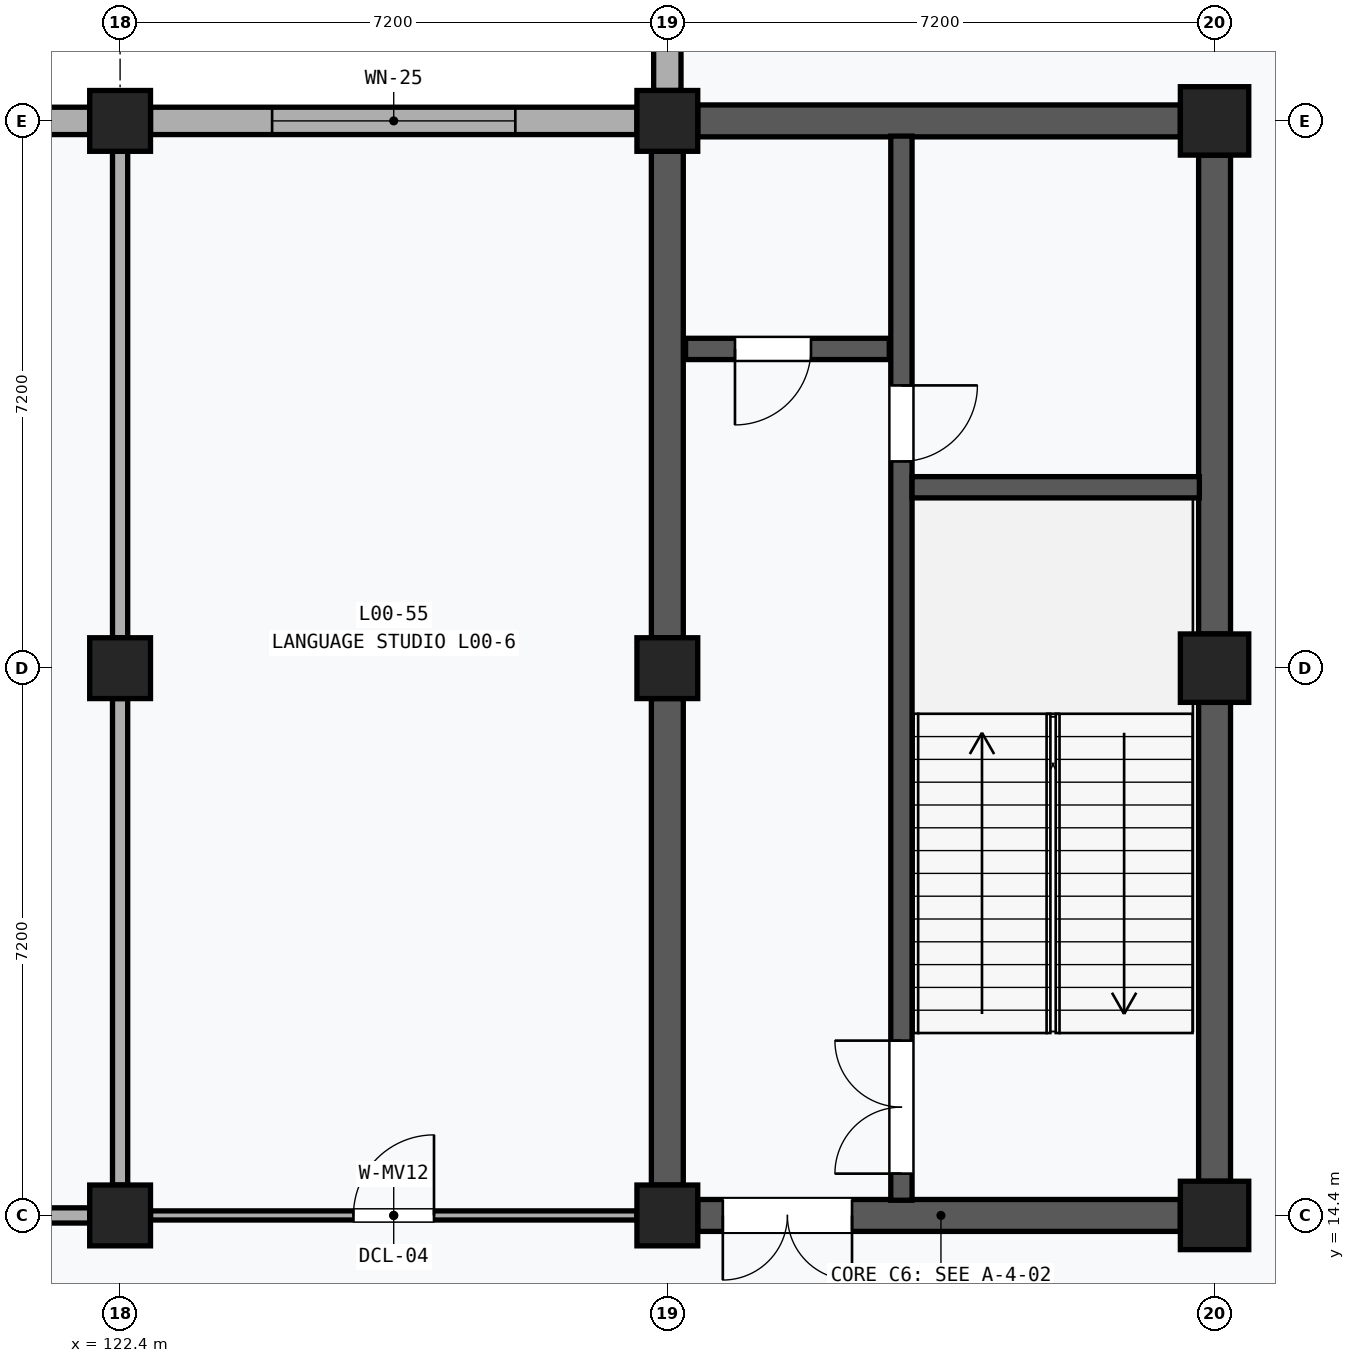
"""IFC4 building model, lengths in metres.
Left out: names, types, materials, properties, quantities, classifications, styles, units other than length and angle.
Written with IfcOpenShell. Run it as: python <this file> out.ifc"""

import sys

from ifc_helpers import new_model, si_unit, direction, frame, frame_2d, origin, origin_2d, place, context, subcontext, project, spatial, rectangle, extrude, element, fill, save


model = new_model("IFC4")
c1 = context("Model", 3, precision=1e-05, world=origin(), true_north=direction((0.0, 1.0)))
c2 = subcontext(c1, "Body", "Model", "MODEL_VIEW")
j1 = project(units=[si_unit("LENGTHUNIT", "METRE"), si_unit("PLANEANGLEUNIT", "RADIAN")], contexts=[c1])
p1 = place(None, origin())
s1 = spatial("IfcSite", under=j1, at=p1, CompositionType="ELEMENT")
p2 = place(p1, origin())
s2 = spatial("IfcBuilding", under=s1, at=p2, CompositionType="ELEMENT")
p3 = place(p2, origin())
s3 = spatial("IfcBuildingStorey", under=s2, at=p3, CompositionType="ELEMENT", Elevation=0.0)
for number, where, z_axis, x_axis in (
    (1, (122.4, 14.4, 0.0), (0.0, 0.0, 1.0), (1.0, 0.0, 0.0)),
    (2, (122.4, 21.6, 0.0), (0.0, 0.0, 1.0), (1.0, 0.0, 0.0)),
    (3, (122.4, 28.8, 0.0), (0.0, 0.0, 1.0), (1.0, 0.0, 0.0)),
    (4, (129.6, 14.4, 0.0), (0.0, 0.0, 1.0), (1.0, 0.0, 0.0)),
    (5, (129.6, 21.6, 0.0), (0.0, 0.0, 1.0), (1.0, 0.0, 0.0)),
    (6, (129.6, 28.8, 0.0), (0.0, 0.0, 1.0), (1.0, 0.0, 0.0)),
):
    element("IfcColumn", number, at=place(p3, frame(where, z_axis=z_axis, x_axis=x_axis)), inside=s3, PredefinedType="COLUMN", context=c2, shape_type="SweptSolid", body=[
        extrude(rectangle(XDim=0.8, YDim=0.8, at=origin_2d()), origin(), (0.0, 0.0, 1.0), 4.8),
    ])
for number, where, z_axis, x_axis in (
    (7, (136.8, 14.4, 0.0), (0.0, 0.0, 1.0), (1.0, 0.0, 0.0)),
    (8, (136.8, 21.6, 0.0), (0.0, 0.0, 1.0), (1.0, 0.0, 0.0)),
    (9, (136.8, 28.8, 0.0), (0.0, 0.0, 1.0), (1.0, 0.0, 0.0)),
):
    element("IfcColumn", number, at=place(p3, frame(where, z_axis=z_axis, x_axis=x_axis)), inside=s3, PredefinedType="COLUMN", context=c2, shape_type="SweptSolid", body=[
        extrude(rectangle(XDim=0.9, YDim=0.9, at=origin_2d()), origin(), (0.0, 0.0, 1.0), 4.8),
    ])
p4 = place(p3, frame((115.45, 28.8, 0.0), z_axis=(0.0, 0.0, 1.0), x_axis=(1.0, 0.0, 0.0)))
e10 = element("IfcWall", 10, at=p4, inside=s3, PredefinedType="SOLIDWALL", context=c2, shape_type="SweptSolid", body=[
    extrude(rectangle(XDim=6.55, YDim=0.36, at=frame_2d((3.275, 0.0))), origin(), (0.0, 0.0, 1.0), 3.89),
])
p5 = place(p4, frame((1.875, 0.0, 0.7)))
e11 = element("IfcOpeningElement", 11, at=p5, cuts=e10, PredefinedType="OPENING", context=c2, shape_type="SweptSolid", body=[
    extrude(rectangle(XDim=2.8, YDim=2.2, at=frame_2d((1.4, 1.1))), frame((0.0, 0.192, 0.0), z_axis=(0.0, -1.0, 0.0), x_axis=(1.0, 0.0, 0.0)), (0.0, 0.0, 1.0), 0.384),
])
p6 = place(p3, frame((122.8, 28.8, 0.0), z_axis=(0.0, 0.0, 1.0), x_axis=(1.0, 0.0, 0.0)))
e12 = element("IfcWall", 12, at=p6, inside=s3, PredefinedType="SOLIDWALL", context=c2, shape_type="SweptSolid", body=[
    extrude(rectangle(XDim=6.4, YDim=0.36, at=frame_2d((3.2, 0.0))), origin(), (0.0, 0.0, 1.0), 3.89),
])
p7 = place(p6, frame((1.6, 0.0, 0.7)))
e13 = element("IfcOpeningElement", 13, at=p7, cuts=e12, PredefinedType="OPENING", context=c2, shape_type="SweptSolid", body=[
    extrude(rectangle(XDim=3.2, YDim=2.2, at=frame_2d((1.6, 1.1))), frame((0.0, 0.192, 0.0), z_axis=(0.0, -1.0, 0.0), x_axis=(1.0, 0.0, 0.0)), (0.0, 0.0, 1.0), 0.384),
])
p8 = place(p3, frame((129.6, 29.2, 0.0), z_axis=(0.0, 0.0, 1.0), x_axis=(0.0, 1.0, 0.0)))
e14 = element("IfcWall", 14, at=p8, inside=s3, PredefinedType="SOLIDWALL", context=c2, shape_type="SweptSolid", body=[
    extrude(rectangle(XDim=6.4, YDim=0.36, at=frame_2d((3.2, 0.0))), origin(), (0.0, 0.0, 1.0), 3.89),
])
p9 = place(p8, frame((1.4, 0.0, 0.7)))
e15 = element("IfcOpeningElement", 15, at=p9, cuts=e14, PredefinedType="OPENING", context=c2, shape_type="SweptSolid", body=[
    extrude(rectangle(XDim=3.6, YDim=2.2, at=frame_2d((1.8, 1.1))), frame((0.0, 0.192, 0.0), z_axis=(0.0, -1.0, 0.0), x_axis=(1.0, 0.0, 0.0)), (0.0, 0.0, 1.0), 0.384),
])
for number, where, z_axis, x_axis in (
    (16, (129.6, 14.8, 0.0), (0.0, 0.0, 1.0), (0.0, 1.0, 0.0)),
    (17, (129.6, 22.0, 0.0), (0.0, 0.0, 1.0), (0.0, 1.0, 0.0)),
):
    element("IfcWall", number, at=place(p3, frame(where, z_axis=z_axis, x_axis=x_axis)), inside=s3, PredefinedType="SHEAR", context=c2, shape_type="SweptSolid", body=[
        extrude(rectangle(XDim=6.4, YDim=0.42, at=frame_2d((3.2, 0.0))), origin(), (0.0, 0.0, 1.0), 3.62),
    ])
p10 = place(p3, frame((136.8, 14.85, 0.0), z_axis=(0.0, 0.0, 1.0), x_axis=(0.0, 1.0, 0.0)))
e18 = element("IfcWall", 18, at=p10, inside=s3, PredefinedType="SHEAR", context=c2, shape_type="SweptSolid", body=[
    extrude(rectangle(XDim=6.3, YDim=0.42, at=frame_2d((3.15, 0.0))), origin(), (0.0, 0.0, 1.0), 3.62),
])
p11 = place(p3, frame((136.8, 22.05, 0.0), z_axis=(0.0, 0.0, 1.0), x_axis=(0.0, 1.0, 0.0)))
e19 = element("IfcWall", 19, at=p11, inside=s3, PredefinedType="SHEAR", context=c2, shape_type="SweptSolid", body=[
    extrude(rectangle(XDim=6.3, YDim=0.42, at=frame_2d((3.15, 0.0))), origin(), (0.0, 0.0, 1.0), 3.62),
])
p12 = place(p3, frame((130.0, 14.4, 0.0), z_axis=(0.0, 0.0, 1.0), x_axis=(1.0, 0.0, 0.0)))
e20 = element("IfcWall", 20, at=p12, inside=s3, PredefinedType="SHEAR", context=c2, shape_type="SweptSolid", body=[
    extrude(rectangle(XDim=6.35, YDim=0.42, at=frame_2d((3.175, 0.0))), origin(), (0.0, 0.0, 1.0), 3.62),
])
p13 = place(p12, frame((0.33, 0.0, 0.0)))
e21 = element("IfcOpeningElement", 21, at=p13, cuts=e20, PredefinedType="OPENING", context=c2, shape_type="SweptSolid", body=[
    extrude(rectangle(XDim=1.7, YDim=2.25, at=frame_2d((0.85, 1.125))), frame((0.0, 0.222, 0.0), z_axis=(0.0, -1.0, 0.0), x_axis=(1.0, 0.0, 0.0)), (0.0, 0.0, 1.0), 0.444),
])
p14 = place(p3, frame((130.0, 28.8, 0.0), z_axis=(0.0, 0.0, 1.0), x_axis=(1.0, 0.0, 0.0)))
e22 = element("IfcWall", 22, at=p14, inside=s3, PredefinedType="SHEAR", context=c2, shape_type="SweptSolid", body=[
    extrude(rectangle(XDim=6.35, YDim=0.42, at=frame_2d((3.175, 0.0))), origin(), (0.0, 0.0, 1.0), 3.62),
])
p15 = place(p3, frame((132.68, 14.6, 0.0), z_axis=(0.0, 0.0, 1.0), x_axis=(0.0, 1.0, 0.0)))
e23 = element("IfcWall", 23, at=p15, inside=s3, PredefinedType="SHEAR", context=c2, shape_type="SweptSolid", body=[
    extrude(rectangle(XDim=14.0, YDim=0.28, at=frame_2d((7.0, 0.0))), origin(), (0.0, 0.0, 1.0), 4.52),
])
p16 = place(p15, frame((0.35, 0.0, 0.0)))
e24 = element("IfcOpeningElement", 24, at=p16, cuts=e23, PredefinedType="OPENING", context=c2, shape_type="SweptSolid", body=[
    extrude(rectangle(XDim=1.75, YDim=2.15, at=frame_2d((0.875, 1.075))), frame((0.0, 0.152, 0.0), z_axis=(0.0, -1.0, 0.0), x_axis=(1.0, 0.0, 0.0)), (0.0, 0.0, 1.0), 0.304),
])
p17 = place(p15, frame((9.72, 0.0, 0.0)))
e25 = element("IfcOpeningElement", 25, at=p17, cuts=e23, PredefinedType="OPENING", context=c2, shape_type="SweptSolid", body=[
    extrude(rectangle(XDim=1.0, YDim=2.15, at=frame_2d((0.5, 1.075))), frame((0.0, 0.152, 0.0), z_axis=(0.0, -1.0, 0.0), x_axis=(1.0, 0.0, 0.0)), (0.0, 0.0, 1.0), 0.304),
])
p18 = place(p3, frame((132.82, 23.98, 0.0), z_axis=(0.0, 0.0, 1.0), x_axis=(1.0, 0.0, 0.0)))
e26 = element("IfcWall", 26, at=p18, inside=s3, PredefinedType="SHEAR", context=c2, shape_type="SweptSolid", body=[
    extrude(rectangle(XDim=3.78, YDim=0.28, at=frame_2d((1.89, 0.0))), origin(), (0.0, 0.0, 1.0), 4.52),
])
p19 = place(p3, frame((129.84, 25.8, 0.0), z_axis=(0.0, 0.0, 1.0), x_axis=(1.0, 0.0, 0.0)))
e27 = element("IfcWall", 27, at=p19, inside=s3, PredefinedType="SHEAR", context=c2, shape_type="SweptSolid", body=[
    extrude(rectangle(XDim=2.68, YDim=0.28, at=frame_2d((1.34, 0.0))), origin(), (0.0, 0.0, 1.0), 4.52),
])
p20 = place(p19, frame((0.65, 0.0, 0.0)))
e28 = element("IfcOpeningElement", 28, at=p20, cuts=e27, PredefinedType="OPENING", context=c2, shape_type="SweptSolid", body=[
    extrude(rectangle(XDim=1.0, YDim=2.15, at=frame_2d((0.5, 1.075))), frame((0.0, 0.152, 0.0), z_axis=(0.0, -1.0, 0.0), x_axis=(1.0, 0.0, 0.0)), (0.0, 0.0, 1.0), 0.304),
])
p21 = place(p3, frame((115.6, 14.4, 0.0), z_axis=(0.0, 0.0, 1.0), x_axis=(1.0, 0.0, 0.0)))
e29 = element("IfcWall", 29, at=p21, inside=s3, PredefinedType="PARTITIONING", context=c2, shape_type="SweptSolid", body=[
    extrude(rectangle(XDim=6.4, YDim=0.2, at=frame_2d((3.2, 0.0))), origin(), (0.0, 0.0, 1.0), 3.62),
])
p22 = place(p21, frame((2.68, 0.0, 0.0)))
e30 = element("IfcOpeningElement", 30, at=p22, cuts=e29, PredefinedType="OPENING", context=c2, shape_type="SweptSolid", body=[
    extrude(rectangle(XDim=1.04, YDim=2.14, at=frame_2d((0.52, 1.07))), frame((0.0, 0.112, 0.0), z_axis=(0.0, -1.0, 0.0), x_axis=(1.0, 0.0, 0.0)), (0.0, 0.0, 1.0), 0.224),
])
for number, where, z_axis, x_axis in (
    (31, (122.4, 14.8, 0.0), (0.0, 0.0, 1.0), (0.0, 1.0, 0.0)),
    (32, (122.4, 22.0, 0.0), (0.0, 0.0, 1.0), (0.0, 1.0, 0.0)),
):
    element("IfcWall", number, at=place(p3, frame(where, z_axis=z_axis, x_axis=x_axis)), inside=s3, PredefinedType="PARTITIONING", context=c2, shape_type="SweptSolid", body=[
        extrude(rectangle(XDim=6.4, YDim=0.2, at=frame_2d((3.2, 0.0))), origin(), (0.0, 0.0, 1.0), 3.62),
    ])
p23 = place(p3, frame((122.8, 14.4, 0.0), z_axis=(0.0, 0.0, 1.0), x_axis=(1.0, 0.0, 0.0)))
e33 = element("IfcWall", 33, at=p23, inside=s3, PredefinedType="MOVABLE", context=c2, shape_type="SweptSolid", body=[
    extrude(rectangle(XDim=6.4, YDim=0.12, at=frame_2d((3.2, 0.0))), origin(), (0.0, 0.0, 1.0), 3.62),
])
p24 = place(p23, frame((2.67, 0.0, 0.0)))
e34 = element("IfcOpeningElement", 34, at=p24, cuts=e33, PredefinedType="OPENING", context=c2, shape_type="SweptSolid", body=[
    extrude(rectangle(XDim=1.06, YDim=2.16, at=frame_2d((0.53, 1.08))), frame((0.0, 0.072, 0.0), z_axis=(0.0, -1.0, 0.0), x_axis=(1.0, 0.0, 0.0)), (0.0, 0.0, 1.0), 0.144),
])
p25 = place(p7, origin())
e35 = element("IfcWindow", 35, at=p25, inside=s3, PartitioningType="SINGLE_PANEL", PredefinedType="WINDOW", context=c2, shape_type="SweptSolid", body=[
    extrude(rectangle(XDim=3.2, YDim=2.2, at=frame_2d((1.6, 1.1))), frame((0.0, 0.03, 0.0), z_axis=(0.0, -1.0, 0.0), x_axis=(1.0, 0.0, 0.0)), (0.0, 0.0, 1.0), 0.06),
])
fill(e13, e35)
p26 = place(p13, frame((1.7, 0.0, 0.0), z_axis=(0.0, 0.0, 1.0), x_axis=(-1.0, 0.0, 0.0)))
e36 = element("IfcDoor", 36, at=p26, inside=s3, OperationType="DOUBLE_DOOR_SINGLE_SWING", PredefinedType="DOOR", context=c2, shape_type="SweptSolid", body=[
    extrude(rectangle(XDim=1.7, YDim=2.25, at=frame_2d((0.85, 1.125))), frame((0.0, 0.025, 0.0), z_axis=(0.0, -1.0, 0.0), x_axis=(1.0, 0.0, 0.0)), (0.0, 0.0, 1.0), 0.05),
])
fill(e21, e36)
p27 = place(p16, origin())
e37 = element("IfcDoor", 37, at=p27, inside=s3, OperationType="DOUBLE_DOOR_SINGLE_SWING", PredefinedType="DOOR", context=c2, shape_type="SweptSolid", body=[
    extrude(rectangle(XDim=1.75, YDim=2.15, at=frame_2d((0.875, 1.075))), frame((0.0, 0.025, 0.0), z_axis=(0.0, -1.0, 0.0), x_axis=(1.0, 0.0, 0.0)), (0.0, 0.0, 1.0), 0.05),
])
fill(e24, e37)
p28 = place(p17, frame((1.0, 0.0, 0.0), z_axis=(0.0, 0.0, 1.0), x_axis=(-1.0, 0.0, 0.0)))
e38 = element("IfcDoor", 38, at=p28, inside=s3, OperationType="SINGLE_SWING_LEFT", PredefinedType="DOOR", context=c2, shape_type="SweptSolid", body=[
    extrude(rectangle(XDim=1.0, YDim=2.15, at=frame_2d((0.5, 1.075))), frame((0.0, 0.025, 0.0), z_axis=(0.0, -1.0, 0.0), x_axis=(1.0, 0.0, 0.0)), (0.0, 0.0, 1.0), 0.05),
])
fill(e25, e38)
p29 = place(p20, frame((1.0, 0.0, 0.0), z_axis=(0.0, 0.0, 1.0), x_axis=(-1.0, 0.0, 0.0)))
e39 = element("IfcDoor", 39, at=p29, inside=s3, OperationType="SINGLE_SWING_RIGHT", PredefinedType="DOOR", context=c2, shape_type="SweptSolid", body=[
    extrude(rectangle(XDim=1.0, YDim=2.15, at=frame_2d((0.5, 1.075))), frame((0.0, 0.025, 0.0), z_axis=(0.0, -1.0, 0.0), x_axis=(1.0, 0.0, 0.0)), (0.0, 0.0, 1.0), 0.05),
])
fill(e28, e39)
p30 = place(p24, origin())
e40 = element("IfcDoor", 40, at=p30, inside=s3, OperationType="SINGLE_SWING_RIGHT", PredefinedType="DOOR", context=c2, shape_type="SweptSolid", body=[
    extrude(rectangle(XDim=1.06, YDim=2.16, at=frame_2d((0.53, 1.08))), frame((0.0, 0.025, 0.0), z_axis=(0.0, -1.0, 0.0), x_axis=(1.0, 0.0, 0.0)), (0.0, 0.0, 1.0), 0.05),
])
fill(e34, e40)
save(model, sys.argv[1])
